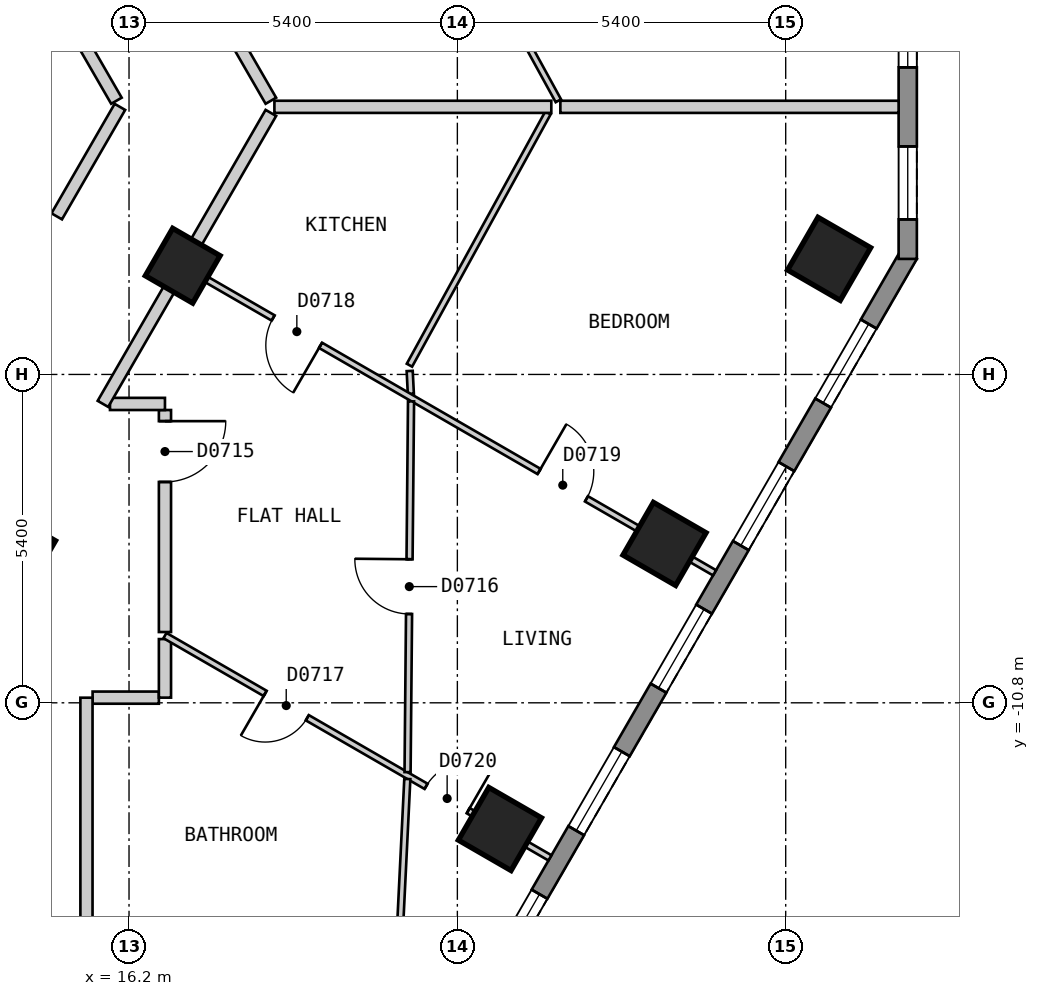
"""IFC4 building model, lengths in metres.
Left out: names, types, materials, properties, quantities, classifications, styles, units other than length and angle.
Written with IfcOpenShell. Run it as: python <this file> out.ifc"""

import sys

from ifc_helpers import new_model, si_unit, direction, frame, frame_2d, origin, origin_2d, place, context, subcontext, project, spatial, polyline, rectangle, outline, extrude, element, fill, save


model = new_model("IFC4")
c1 = context("Model", 3, precision=1e-05, world=origin(), true_north=direction((0.0, 1.0)))
c2 = subcontext(c1, "Body", "Model", "MODEL_VIEW")
j1 = project(units=[si_unit("LENGTHUNIT", "METRE"), si_unit("PLANEANGLEUNIT", "RADIAN")], contexts=[c1])
p1 = place(None, origin())
s1 = spatial("IfcSite", under=j1, at=p1, CompositionType="ELEMENT")
p2 = place(p1, origin())
s2 = spatial("IfcBuilding", under=s1, at=p2, CompositionType="ELEMENT")
p3 = place(p2, frame((0.0, 0.0, 93.0)))
s3 = spatial("IfcBuildingStorey", under=s2, at=p3, CompositionType="ELEMENT", Elevation=93.0)
for number, where, z_axis, x_axis in (
    (1, (22.3, -12.875, 0.0), (0.0, 0.0, 1.0), (0.5, 0.866, 0.0)),
    (2, (25.007, -8.187, 0.0), (0.0, 0.0, 1.0), (0.5, 0.866, 0.0)),
    (3, (27.714, -3.499, 0.0), (0.0, 0.0, 1.0), (0.5, 0.866, 0.0)),
):
    element("IfcColumn", number, at=place(p3, frame(where, z_axis=z_axis, x_axis=x_axis)), inside=s3, PredefinedType="COLUMN", context=c2, shape_type="SweptSolid", body=[
        extrude(rectangle(XDim=1.0, YDim=1.0, at=origin_2d()), origin(), (0.0, 0.0, 1.0), 3.0),
    ])
for number, where, z_axis, x_axis in (
    (4, (14.376, -8.3, 0.0), (0.0, 0.0, 1.0), (0.5, 0.866, 0.0)),
    (5, (17.083, -3.612, 0.0), (0.0, 0.0, 1.0), (0.5, 0.866, 0.0)),
):
    element("IfcColumn", number, at=place(p3, frame(where, z_axis=z_axis, x_axis=x_axis)), inside=s3, PredefinedType="COLUMN", context=c2, shape_type="SweptSolid", body=[
        extrude(rectangle(XDim=0.9, YDim=0.9, at=origin_2d()), origin(), (0.0, 0.0, 1.0), 3.0),
    ])
p4 = place(p3, frame((17.479, -23.425, 0.0), z_axis=(0.0, 0.0, 1.0), x_axis=(0.500035407905, 0.866004960056, 0.0)))
e6 = element("IfcWall", 6, at=p4, inside=s3, PredefinedType="SOLIDWALL", context=c2, shape_type="SweptSolid", body=[
    extrude(outline(polyline([(0.0, -0.15), (23.094, -0.15), (23.014, 0.15), (0.08, 0.15), (0.0, -0.15)])), origin(), (0.0, 0.0, 1.0), 2.7),
])
p5 = place(p4, frame((1.324, 0.0, 0.15)))
e7 = element("IfcOpeningElement", 7, at=p5, cuts=e6, PredefinedType="OPENING", context=c2, shape_type="SweptSolid", body=[
    extrude(rectangle(XDim=1.5, YDim=2.1, at=frame_2d((0.75, 1.05))), frame((0.0, 0.16, 0.0), z_axis=(0.0, -1.0, 0.0), x_axis=(1.0, 0.0, 0.0)), (0.0, 0.0, 1.0), 0.32),
])
p6 = place(p4, frame((4.031, 0.0, 0.15)))
e8 = element("IfcOpeningElement", 8, at=p6, cuts=e6, PredefinedType="OPENING", context=c2, shape_type="SweptSolid", body=[
    extrude(rectangle(XDim=1.5, YDim=2.1, at=frame_2d((0.75, 1.05))), frame((0.0, 0.16, 0.0), z_axis=(0.0, -1.0, 0.0), x_axis=(1.0, 0.0, 0.0)), (0.0, 0.0, 1.0), 0.32),
])
p7 = place(p4, frame((6.737, 0.0, 0.15)))
e9 = element("IfcOpeningElement", 9, at=p7, cuts=e6, PredefinedType="OPENING", context=c2, shape_type="SweptSolid", body=[
    extrude(rectangle(XDim=1.5, YDim=2.1, at=frame_2d((0.75, 1.05))), frame((0.0, 0.16, 0.0), z_axis=(0.0, -1.0, 0.0), x_axis=(1.0, 0.0, 0.0)), (0.0, 0.0, 1.0), 0.32),
])
p8 = place(p4, frame((9.444, 0.0, 0.15)))
e10 = element("IfcOpeningElement", 10, at=p8, cuts=e6, PredefinedType="OPENING", context=c2, shape_type="SweptSolid", body=[
    extrude(rectangle(XDim=1.5, YDim=2.1, at=frame_2d((0.75, 1.05))), frame((0.0, 0.16, 0.0), z_axis=(0.0, -1.0, 0.0), x_axis=(1.0, 0.0, 0.0)), (0.0, 0.0, 1.0), 0.32),
])
p9 = place(p4, frame((12.151, 0.0, 0.15)))
e11 = element("IfcOpeningElement", 11, at=p9, cuts=e6, PredefinedType="OPENING", context=c2, shape_type="SweptSolid", body=[
    extrude(rectangle(XDim=1.5, YDim=2.1, at=frame_2d((0.75, 1.05))), frame((0.0, 0.16, 0.0), z_axis=(0.0, -1.0, 0.0), x_axis=(1.0, 0.0, 0.0)), (0.0, 0.0, 1.0), 0.32),
])
p10 = place(p4, frame((14.857, 0.0, 0.15)))
e12 = element("IfcOpeningElement", 12, at=p10, cuts=e6, PredefinedType="OPENING", context=c2, shape_type="SweptSolid", body=[
    extrude(rectangle(XDim=1.5, YDim=2.1, at=frame_2d((0.75, 1.05))), frame((0.0, 0.16, 0.0), z_axis=(0.0, -1.0, 0.0), x_axis=(1.0, 0.0, 0.0)), (0.0, 0.0, 1.0), 0.32),
])
p11 = place(p4, frame((17.564, 0.0, 0.15)))
e13 = element("IfcOpeningElement", 13, at=p11, cuts=e6, PredefinedType="OPENING", context=c2, shape_type="SweptSolid", body=[
    extrude(rectangle(XDim=1.5, YDim=2.1, at=frame_2d((0.75, 1.05))), frame((0.0, 0.16, 0.0), z_axis=(0.0, -1.0, 0.0), x_axis=(1.0, 0.0, 0.0)), (0.0, 0.0, 1.0), 0.32),
])
p12 = place(p4, frame((20.271, 0.0, 0.15)))
e14 = element("IfcOpeningElement", 14, at=p12, cuts=e6, PredefinedType="OPENING", context=c2, shape_type="SweptSolid", body=[
    extrude(rectangle(XDim=1.5, YDim=2.1, at=frame_2d((0.75, 1.05))), frame((0.0, 0.16, 0.0), z_axis=(0.0, -1.0, 0.0), x_axis=(1.0, 0.0, 0.0)), (0.0, 0.0, 1.0), 0.32),
])
p13 = place(p3, frame((29.007, -3.5, 0.0), z_axis=(0.0, 0.0, 1.0), x_axis=(0.0, 1.0, 0.0)))
e15 = element("IfcWall", 15, at=p13, inside=s3, PredefinedType="SOLIDWALL", context=c2, shape_type="SweptSolid", body=[
    extrude(outline(polyline([(0.0, -0.15), (5.0, -0.15), (4.92, 0.15), (0.08, 0.15), (0.0, -0.15)])), origin(), (0.0, 0.0, 1.0), 2.7),
])
p14 = place(p13, frame((0.65, 0.0, 0.15)))
e16 = element("IfcOpeningElement", 16, at=p14, cuts=e15, PredefinedType="OPENING", context=c2, shape_type="SweptSolid", body=[
    extrude(rectangle(XDim=1.2, YDim=2.1, at=frame_2d((0.6, 1.05))), frame((0.0, 0.16, 0.0), z_axis=(0.0, -1.0, 0.0), x_axis=(1.0, 0.0, 0.0)), (0.0, 0.0, 1.0), 0.32),
])
p15 = place(p13, frame((3.15, 0.0, 0.15)))
e17 = element("IfcOpeningElement", 17, at=p15, cuts=e15, PredefinedType="OPENING", context=c2, shape_type="SweptSolid", body=[
    extrude(rectangle(XDim=1.2, YDim=2.1, at=frame_2d((0.6, 1.05))), frame((0.0, 0.16, 0.0), z_axis=(0.0, -1.0, 0.0), x_axis=(1.0, 0.0, 0.0)), (0.0, 0.0, 1.0), 0.32),
])
p16 = place(p3, frame((10.913, 7.899, 0.0), z_axis=(0.0, 0.0, 1.0), x_axis=(0.500028940566, -0.866008694296, 0.0)))
e18 = element("IfcWall", 18, at=p16, inside=s3, PredefinedType="PARTITIONING", context=c2, shape_type="SweptSolid", body=[
    extrude(rectangle(XDim=10.159, YDim=0.2, at=frame_2d((5.08, 0.0))), origin(), (0.0, 0.0, 1.0), 2.7),
])
p17 = place(p16, frame((4.63, 0.0, 0.0)))
e19 = element("IfcOpeningElement", 19, at=p17, cuts=e18, PredefinedType="OPENING", context=c2, shape_type="SweptSolid", body=[
    extrude(rectangle(XDim=0.9, YDim=2.1, at=frame_2d((0.45, 1.05))), frame((0.0, 0.11, 0.0), z_axis=(0.0, -1.0, 0.0), x_axis=(1.0, 0.0, 0.0)), (0.0, 0.0, 1.0), 0.22),
])
p18 = place(p3, frame((8.488, 16.5, 0.0), z_axis=(0.0, 0.0, 1.0), x_axis=(0.499986836607, -0.86603300354, 0.0)))
e20 = element("IfcWall", 20, at=p18, inside=s3, PredefinedType="PARTITIONING", context=c2, shape_type="SweptSolid", body=[
    extrude(rectangle(XDim=20.09, YDim=0.2, at=frame_2d((10.045, 0.0))), origin(), (0.0, 0.0, 1.0), 2.7),
])
p19 = place(p18, frame((14.569, 0.0, 0.0)))
e21 = element("IfcOpeningElement", 21, at=p19, cuts=e20, PredefinedType="OPENING", context=c2, shape_type="SweptSolid", body=[
    extrude(rectangle(XDim=1.0, YDim=2.1, at=frame_2d((0.5, 1.05))), frame((0.0, 0.11, 0.0), z_axis=(0.0, -1.0, 0.0), x_axis=(1.0, 0.0, 0.0)), (0.0, 0.0, 1.0), 0.22),
])
p20 = place(p18, frame((4.547, 0.0, 0.0)))
e22 = element("IfcOpeningElement", 22, at=p20, cuts=e20, PredefinedType="OPENING", context=c2, shape_type="SweptSolid", body=[
    extrude(rectangle(XDim=1.0, YDim=2.1, at=frame_2d((0.5, 1.05))), frame((0.0, 0.11, 0.0), z_axis=(0.0, -1.0, 0.0), x_axis=(1.0, 0.0, 0.0)), (0.0, 0.0, 1.0), 0.22),
])
p21 = place(p3, frame((16.791, -5.985, 0.0), z_axis=(0.0, 0.0, 1.0), x_axis=(0.0, -1.0, 0.0)))
e23 = element("IfcWall", 23, at=p21, inside=s3, PredefinedType="PARTITIONING", context=c2, shape_type="SweptSolid", body=[
    extrude(rectangle(XDim=3.651, YDim=0.2, at=frame_2d((1.825, 0.0))), origin(), (0.0, 0.0, 1.0), 2.7),
])
p22 = place(p21, frame((0.183, 0.0, 0.0)))
e24 = element("IfcOpeningElement", 24, at=p22, cuts=e23, PredefinedType="OPENING", context=c2, shape_type="SweptSolid", body=[
    extrude(rectangle(XDim=1.0, YDim=2.1, at=frame_2d((0.5, 1.05))), frame((0.0, 0.11, 0.0), z_axis=(0.0, -1.0, 0.0), x_axis=(1.0, 0.0, 0.0)), (0.0, 0.0, 1.0), 0.22),
])
p23 = place(p3, frame((15.887, -5.885, 0.0), z_axis=(0.0, 0.0, 1.0), x_axis=(1.0, 0.0, 0.0)))
e25 = element("IfcWall", 25, at=p23, inside=s3, PredefinedType="PARTITIONING", context=c2, shape_type="SweptSolid", body=[
    extrude(rectangle(XDim=0.904, YDim=0.2, at=frame_2d((0.452, 0.0))), origin(), (0.0, 0.0, 1.0), 2.7),
])
p24 = place(p3, frame((15.601, -10.715, 0.0), z_axis=(0.0, 0.0, 1.0), x_axis=(1.0, 0.0, 0.0)))
e26 = element("IfcWall", 26, at=p24, inside=s3, PredefinedType="PARTITIONING", context=c2, shape_type="SweptSolid", body=[
    extrude(rectangle(XDim=1.09, YDim=0.2, at=frame_2d((0.545, 0.0))), origin(), (0.0, 0.0, 1.0), 2.7),
])
p25 = place(p3, frame((15.011, -2.8, 0.0), z_axis=(0.0, 0.0, 1.0), x_axis=(0.499929208183, 0.866066271601, 0.0)))
e27 = element("IfcWall", 27, at=p25, inside=s3, PredefinedType="PARTITIONING", context=c2, shape_type="SweptSolid", body=[
    extrude(rectangle(XDim=2.078, YDim=0.2, at=frame_2d((1.039, 0.0))), origin(), (0.0, 0.0, 1.0), 2.7),
])
p26 = place(p3, frame((15.771, -5.884, 0.0), z_axis=(0.0, 0.0, 1.0), x_axis=(0.499917542299, 0.866073005526, 0.0)))
e28 = element("IfcWall", 28, at=p26, inside=s3, PredefinedType="PARTITIONING", context=c2, shape_type="SweptSolid", body=[
    extrude(rectangle(XDim=5.525, YDim=0.2, at=frame_2d((2.762, 0.0))), origin(), (0.0, 0.0, 1.0), 2.7),
])
p27 = place(p3, frame((15.5, -21.199, 0.0), z_axis=(0.0, 0.0, 1.0), x_axis=(0.0, 1.0, 0.0)))
e29 = element("IfcWall", 29, at=p27, inside=s3, PredefinedType="PARTITIONING", context=c2, shape_type="SweptSolid", body=[
    extrude(rectangle(XDim=10.483, YDim=0.2, at=frame_2d((5.241, 0.0))), origin(), (0.0, 0.0, 1.0), 2.7),
])
p28 = place(p3, frame((16.791, -10.715, 0.0), z_axis=(0.0, 0.0, 1.0), x_axis=(0.0, 1.0, 0.0)))
e30 = element("IfcWall", 30, at=p28, inside=s3, PredefinedType="PARTITIONING", context=c2, shape_type="SweptSolid", body=[
    extrude(rectangle(XDim=0.963, YDim=0.2, at=frame_2d((0.481, 0.0))), origin(), (0.0, 0.0, 1.0), 2.7),
])
p29 = place(p3, frame((20.939, 3.331, 0.0), z_axis=(0.0, 0.0, 1.0), x_axis=(0.481207738216, -0.876606589458, 0.0)))
e31 = element("IfcWall", 31, at=p29, inside=s3, PredefinedType="PARTITIONING", context=c2, shape_type="SweptSolid", body=[
    extrude(rectangle(XDim=4.825, YDim=0.1, at=frame_2d((2.413, 0.0))), origin(), (0.0, 0.0, 1.0), 2.7),
])
p30 = place(p3, frame((20.816, -5.343, 0.0), z_axis=(0.0, 0.0, 1.0), x_axis=(0.05045379463, -0.99872639627, 0.0)))
e32 = element("IfcWall", 32, at=p30, inside=s3, PredefinedType="PARTITIONING", context=c2, shape_type="SweptSolid", body=[
    extrude(rectangle(XDim=0.377, YDim=0.1, at=frame_2d((0.189, 0.0))), origin(), (0.0, 0.0, 1.0), 2.7),
])
p31 = place(p3, frame((16.791, -9.694, 0.0), z_axis=(0.0, 0.0, 1.0), x_axis=(0.866013208994, -0.500021121402, 0.0)))
e33 = element("IfcWall", 33, at=p31, inside=s3, PredefinedType="PARTITIONING", context=c2, shape_type="SweptSolid", body=[
    extrude(rectangle(XDim=7.312, YDim=0.1, at=frame_2d((3.656, 0.0))), origin(), (0.0, 0.0, 1.0), 2.7),
])
p32 = place(p31, frame((1.903, 0.0, 0.0)))
e34 = element("IfcOpeningElement", 34, at=p32, cuts=e33, PredefinedType="OPENING", context=c2, shape_type="SweptSolid", body=[
    extrude(rectangle(XDim=0.8, YDim=2.1, at=frame_2d((0.4, 1.05))), frame((0.0, 0.06, 0.0), z_axis=(0.0, -1.0, 0.0), x_axis=(1.0, 0.0, 0.0)), (0.0, 0.0, 1.0), 0.12),
])
p33 = place(p31, frame((4.959, 0.0, 0.0)))
e35 = element("IfcOpeningElement", 35, at=p33, cuts=e33, PredefinedType="OPENING", context=c2, shape_type="SweptSolid", body=[
    extrude(rectangle(XDim=0.8, YDim=2.1, at=frame_2d((0.4, 1.05))), frame((0.0, 0.06, 0.0), z_axis=(0.0, -1.0, 0.0), x_axis=(1.0, 0.0, 0.0)), (0.0, 0.0, 1.0), 0.12),
])
p34 = place(p3, frame((17.169, -3.662, 0.0), z_axis=(0.0, 0.0, 1.0), x_axis=(0.866047370643, -0.499961950354, 0.0)))
e36 = element("IfcWall", 36, at=p34, inside=s3, PredefinedType="PARTITIONING", context=c2, shape_type="SweptSolid", body=[
    extrude(rectangle(XDim=10.001, YDim=0.1, at=frame_2d((5.0, 0.0))), origin(), (0.0, 0.0, 1.0), 2.7),
])
p35 = place(p34, frame((1.618, 0.0, 0.0)))
e37 = element("IfcOpeningElement", 37, at=p35, cuts=e36, PredefinedType="OPENING", context=c2, shape_type="SweptSolid", body=[
    extrude(rectangle(XDim=0.9, YDim=2.1, at=frame_2d((0.45, 1.05))), frame((0.0, 0.06, 0.0), z_axis=(0.0, -1.0, 0.0), x_axis=(1.0, 0.0, 0.0)), (0.0, 0.0, 1.0), 0.12),
])
p36 = place(p34, frame((6.668, 0.0, 0.0)))
e38 = element("IfcOpeningElement", 38, at=p36, cuts=e36, PredefinedType="OPENING", context=c2, shape_type="SweptSolid", body=[
    extrude(rectangle(XDim=0.9, YDim=2.1, at=frame_2d((0.45, 1.05))), frame((0.0, 0.06, 0.0), z_axis=(0.0, -1.0, 0.0), x_axis=(1.0, 0.0, 0.0)), (0.0, 0.0, 1.0), 0.12),
])
p37 = place(p3, frame((20.812, -5.248, 0.0), z_axis=(0.0, 0.0, 1.0), x_axis=(0.481296891345, 0.876557643502, 0.0)))
e39 = element("IfcWall", 39, at=p37, inside=s3, PredefinedType="PARTITIONING", context=c2, shape_type="SweptSolid", body=[
    extrude(rectangle(XDim=4.733, YDim=0.1, at=frame_2d((2.367, 0.0))), origin(), (0.0, 0.0, 1.0), 2.7),
])
p38 = place(p3, frame((20.656, -14.527, 0.0), z_axis=(0.0, 0.0, 1.0), x_axis=(0.048885629948, 0.998804382842, 0.0)))
e40 = element("IfcWall", 40, at=p38, inside=s3, PredefinedType="PARTITIONING", context=c2, shape_type="SweptSolid", body=[
    extrude(rectangle(XDim=2.477, YDim=0.1, at=frame_2d((1.239, 0.0))), origin(), (0.0, 0.0, 1.0), 2.7),
])
p39 = place(p3, frame((20.781, -11.94, 0.0), z_axis=(0.0, 0.0, 1.0), x_axis=(0.009329670416, 0.999956477678, 0.0)))
e41 = element("IfcWall", 41, at=p39, inside=s3, PredefinedType="PARTITIONING", context=c2, shape_type="SweptSolid", body=[
    extrude(rectangle(XDim=6.097, YDim=0.1, at=frame_2d((3.049, 0.0))), origin(), (0.0, 0.0, 1.0), 2.7),
])
p40 = place(p39, frame((2.601, 0.0, 0.0)))
e42 = element("IfcOpeningElement", 42, at=p40, cuts=e41, PredefinedType="OPENING", context=c2, shape_type="SweptSolid", body=[
    extrude(rectangle(XDim=0.9, YDim=2.1, at=frame_2d((0.45, 1.05))), frame((0.0, 0.06, 0.0), z_axis=(0.0, -1.0, 0.0), x_axis=(1.0, 0.0, 0.0)), (0.0, 0.0, 1.0), 0.12),
])
p41 = place(p3, frame((18.591, -0.999, 0.0), z_axis=(0.0, 0.0, 1.0), x_axis=(1.0, 0.0, 0.0)))
e43 = element("IfcWall", 43, at=p41, inside=s3, PredefinedType="PARTITIONING", context=c2, shape_type="SweptSolid", body=[
    extrude(rectangle(XDim=4.554, YDim=0.2, at=frame_2d((2.277, 0.0))), origin(), (0.0, 0.0, 1.0), 2.7),
])
p42 = place(p3, frame((23.294, -0.999, 0.0), z_axis=(0.0, 0.0, 1.0), x_axis=(1.0, 0.0, 0.0)))
e44 = element("IfcWall", 44, at=p42, inside=s3, PredefinedType="PARTITIONING", context=c2, shape_type="SweptSolid", body=[
    extrude(rectangle(XDim=5.563, YDim=0.2, at=frame_2d((2.781, 0.0))), origin(), (0.0, 0.0, 1.0), 2.7),
])
p43 = place(p8, origin())
e45 = element("IfcWindow", 45, at=p43, inside=s3, PartitioningType="SINGLE_PANEL", PredefinedType="WINDOW", context=c2, shape_type="SweptSolid", body=[
    extrude(rectangle(XDim=1.5, YDim=2.1, at=frame_2d((0.75, 1.05))), frame((0.0, 0.03, 0.0), z_axis=(0.0, -1.0, 0.0), x_axis=(1.0, 0.0, 0.0)), (0.0, 0.0, 1.0), 0.06),
])
fill(e10, e45)
p44 = place(p9, origin())
e46 = element("IfcWindow", 46, at=p44, inside=s3, PartitioningType="SINGLE_PANEL", PredefinedType="WINDOW", context=c2, shape_type="SweptSolid", body=[
    extrude(rectangle(XDim=1.5, YDim=2.1, at=frame_2d((0.75, 1.05))), frame((0.0, 0.03, 0.0), z_axis=(0.0, -1.0, 0.0), x_axis=(1.0, 0.0, 0.0)), (0.0, 0.0, 1.0), 0.06),
])
fill(e11, e46)
p45 = place(p10, origin())
e47 = element("IfcWindow", 47, at=p45, inside=s3, PartitioningType="SINGLE_PANEL", PredefinedType="WINDOW", context=c2, shape_type="SweptSolid", body=[
    extrude(rectangle(XDim=1.5, YDim=2.1, at=frame_2d((0.75, 1.05))), frame((0.0, 0.03, 0.0), z_axis=(0.0, -1.0, 0.0), x_axis=(1.0, 0.0, 0.0)), (0.0, 0.0, 1.0), 0.06),
])
fill(e12, e47)
p46 = place(p11, origin())
e48 = element("IfcWindow", 48, at=p46, inside=s3, PartitioningType="SINGLE_PANEL", PredefinedType="WINDOW", context=c2, shape_type="SweptSolid", body=[
    extrude(rectangle(XDim=1.5, YDim=2.1, at=frame_2d((0.75, 1.05))), frame((0.0, 0.03, 0.0), z_axis=(0.0, -1.0, 0.0), x_axis=(1.0, 0.0, 0.0)), (0.0, 0.0, 1.0), 0.06),
])
fill(e13, e48)
p47 = place(p12, origin())
e49 = element("IfcWindow", 49, at=p47, inside=s3, PartitioningType="SINGLE_PANEL", PredefinedType="WINDOW", context=c2, shape_type="SweptSolid", body=[
    extrude(rectangle(XDim=1.5, YDim=2.1, at=frame_2d((0.75, 1.05))), frame((0.0, 0.03, 0.0), z_axis=(0.0, -1.0, 0.0), x_axis=(1.0, 0.0, 0.0)), (0.0, 0.0, 1.0), 0.06),
])
fill(e14, e49)
p48 = place(p14, origin())
e50 = element("IfcWindow", 50, at=p48, inside=s3, PartitioningType="SINGLE_PANEL", PredefinedType="WINDOW", context=c2, shape_type="SweptSolid", body=[
    extrude(rectangle(XDim=1.2, YDim=2.1, at=frame_2d((0.6, 1.05))), frame((0.0, 0.03, 0.0), z_axis=(0.0, -1.0, 0.0), x_axis=(1.0, 0.0, 0.0)), (0.0, 0.0, 1.0), 0.06),
])
fill(e16, e50)
p49 = place(p15, origin())
e51 = element("IfcWindow", 51, at=p49, inside=s3, PartitioningType="SINGLE_PANEL", PredefinedType="WINDOW", context=c2, shape_type="SweptSolid", body=[
    extrude(rectangle(XDim=1.2, YDim=2.1, at=frame_2d((0.6, 1.05))), frame((0.0, 0.03, 0.0), z_axis=(0.0, -1.0, 0.0), x_axis=(1.0, 0.0, 0.0)), (0.0, 0.0, 1.0), 0.06),
])
fill(e17, e51)
p50 = place(p22, origin())
e52 = element("IfcDoor", 52, at=p50, inside=s3, OperationType="SINGLE_SWING_LEFT", PredefinedType="DOOR", context=c2, shape_type="SweptSolid", body=[
    extrude(rectangle(XDim=1.0, YDim=2.1, at=frame_2d((0.5, 1.05))), frame((0.0, 0.025, 0.0), z_axis=(0.0, -1.0, 0.0), x_axis=(1.0, 0.0, 0.0)), (0.0, 0.0, 1.0), 0.05),
])
fill(e24, e52)
p51 = place(p40, origin())
e53 = element("IfcDoor", 53, at=p51, inside=s3, OperationType="SINGLE_SWING_RIGHT", PredefinedType="DOOR", context=c2, shape_type="SweptSolid", body=[
    extrude(rectangle(XDim=0.9, YDim=2.1, at=frame_2d((0.45, 1.05))), frame((0.0, 0.025, 0.0), z_axis=(0.0, -1.0, 0.0), x_axis=(1.0, 0.0, 0.0)), (0.0, 0.0, 1.0), 0.05),
])
fill(e42, e53)
p52 = place(p32, origin())
e54 = element("IfcDoor", 54, at=p52, inside=s3, OperationType="SINGLE_SWING_LEFT", PredefinedType="DOOR", context=c2, shape_type="SweptSolid", body=[
    extrude(rectangle(XDim=0.8, YDim=2.1, at=frame_2d((0.4, 1.05))), frame((0.0, 0.025, 0.0), z_axis=(0.0, -1.0, 0.0), x_axis=(1.0, 0.0, 0.0)), (0.0, 0.0, 1.0), 0.05),
])
fill(e34, e54)
p53 = place(p35, origin())
e55 = element("IfcDoor", 55, at=p53, inside=s3, OperationType="SINGLE_SWING_RIGHT", PredefinedType="DOOR", context=c2, shape_type="SweptSolid", body=[
    extrude(rectangle(XDim=0.9, YDim=2.1, at=frame_2d((0.45, 1.05))), frame((0.0, 0.025, 0.0), z_axis=(0.0, -1.0, 0.0), x_axis=(1.0, 0.0, 0.0)), (0.0, 0.0, 1.0), 0.05),
])
fill(e37, e55)
p54 = place(p36, origin())
e56 = element("IfcDoor", 56, at=p54, inside=s3, OperationType="SINGLE_SWING_LEFT", PredefinedType="DOOR", context=c2, shape_type="SweptSolid", body=[
    extrude(rectangle(XDim=0.9, YDim=2.1, at=frame_2d((0.45, 1.05))), frame((0.0, 0.025, 0.0), z_axis=(0.0, -1.0, 0.0), x_axis=(1.0, 0.0, 0.0)), (0.0, 0.0, 1.0), 0.05),
])
fill(e38, e56)
p55 = place(p33, origin())
e57 = element("IfcDoor", 57, at=p55, inside=s3, OperationType="SINGLE_SWING_RIGHT", PredefinedType="DOOR", context=c2, shape_type="SweptSolid", body=[
    extrude(rectangle(XDim=0.8, YDim=2.1, at=frame_2d((0.4, 1.05))), frame((0.0, 0.025, 0.0), z_axis=(0.0, -1.0, 0.0), x_axis=(1.0, 0.0, 0.0)), (0.0, 0.0, 1.0), 0.05),
])
fill(e35, e57)
save(model, sys.argv[1])
